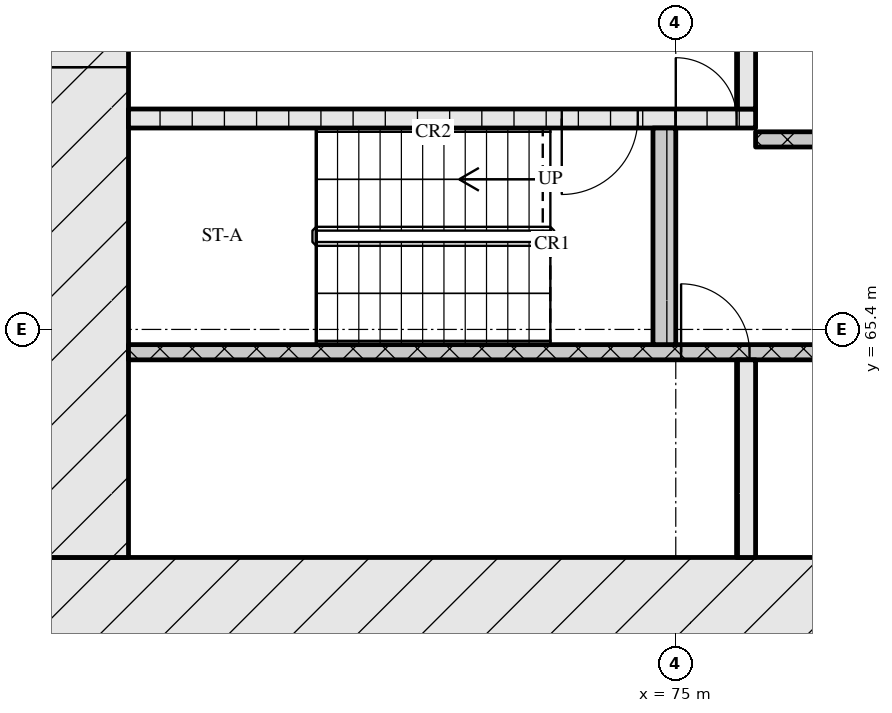
"""IFC4 building model, lengths in metres.
Left out: names, types, materials, properties, quantities, classifications, styles, units other than length and angle.
Written with IfcOpenShell. Run it as: python <this file> out.ifc"""

import sys

from ifc_helpers import new_model, si_unit, direction, frame, frame_2d, origin, place, context, subcontext, project, spatial, rectangle, extrude, element, fill, save


model = new_model("IFC4")
c1 = context("Model", 3, precision=1e-05, world=origin(), true_north=direction((0.0, 1.0)))
c2 = subcontext(c1, "Body", "Model", "MODEL_VIEW")
j1 = project(units=[si_unit("LENGTHUNIT", "METRE"), si_unit("PLANEANGLEUNIT", "RADIAN")], contexts=[c1])
p1 = place(None, origin())
s1 = spatial("IfcSite", under=j1, at=p1, CompositionType="ELEMENT")
p2 = place(p1, origin())
s2 = spatial("IfcBuilding", under=s1, at=p2, CompositionType="ELEMENT")
p3 = place(p2, frame((0.0, 0.0, 28.2)))
s3 = spatial("IfcBuildingStorey", under=s2, at=p3, CompositionType="ELEMENT", Elevation=28.2)
p4 = place(p3, frame((66.6, 61.8, 0.0), z_axis=(0.0, 0.0, 1.0), x_axis=(1.0, 0.0, 0.0)))
e1 = element("IfcWall", 1, at=p4, inside=s3, PredefinedType="SOLIDWALL", context=c2, shape_type="SweptSolid", body=[
    extrude(rectangle(XDim=42.0, YDim=1.2, at=frame_2d((21.0, 0.0))), origin(), (0.0, 0.0, 1.0), 4.2),
])
p5 = place(p4, frame((21.35, 0.0, 0.0)))
e2 = element("IfcOpeningElement", 2, at=p5, cuts=e1, PredefinedType="OPENING", context=c2, shape_type="SweptSolid", body=[
    extrude(rectangle(XDim=1.8, YDim=2.1, at=frame_2d((0.9, 1.05))), frame((0.0, 0.61, 0.0), z_axis=(0.0, -1.0, 0.0), x_axis=(1.0, 0.0, 0.0)), (0.0, 0.0, 1.0), 1.22),
])
p6 = place(p3, frame((67.2, 62.4, 0.0), z_axis=(0.0, 0.0, 1.0), x_axis=(0.0, 1.0, 0.0)))
e3 = element("IfcWall", 3, at=p6, inside=s3, PredefinedType="SOLIDWALL", context=c2, shape_type="SweptSolid", body=[
    extrude(rectangle(XDim=12.0, YDim=1.2, at=frame_2d((6.0, 0.0))), origin(), (0.0, 0.0, 1.0), 4.2),
])
p7 = place(p6, frame((6.45, 0.0, 0.0)))
e4 = element("IfcOpeningElement", 4, at=p7, cuts=e3, PredefinedType="OPENING", context=c2, shape_type="SweptSolid", body=[
    extrude(rectangle(XDim=1.2, YDim=2.1, at=frame_2d((0.6, 1.05))), frame((0.0, 0.61, 0.0), z_axis=(0.0, -1.0, 0.0), x_axis=(1.0, 0.0, 0.0)), (0.0, 0.0, 1.0), 1.22),
])
p8 = place(p3, frame((75.925, 62.4, 0.0), z_axis=(0.0, 0.0, 1.0), x_axis=(0.0, 1.0, 0.0)))
e5 = element("IfcWall", 5, at=p8, inside=s3, PredefinedType="SOLIDWALL", context=c2, shape_type="SweptSolid", body=[
    extrude(rectangle(XDim=2.6, YDim=0.25, at=frame_2d((1.3, 0.0))), origin(), (0.0, 0.0, 1.0), 4.2),
])
p9 = place(p3, frame((67.8, 65.1, 0.0), z_axis=(0.0, 0.0, 1.0), x_axis=(1.0, 0.0, 0.0)))
e6 = element("IfcWall", 6, at=p9, inside=s3, PredefinedType="SOLIDWALL", context=c2, shape_type="SweptSolid", body=[
    extrude(rectangle(XDim=18.5, YDim=0.2, at=frame_2d((9.25, 0.0))), origin(), (0.0, 0.0, 1.0), 4.2),
])
p10 = place(p9, frame((7.27, 0.0, 0.0)))
e7 = element("IfcOpeningElement", 7, at=p10, cuts=e6, PredefinedType="OPENING", context=c2, shape_type="SweptSolid", body=[
    extrude(rectangle(XDim=0.9, YDim=2.1, at=frame_2d((0.45, 1.05))), frame((0.0, 0.11, 0.0), z_axis=(0.0, -1.0, 0.0), x_axis=(1.0, 0.0, 0.0)), (0.0, 0.0, 1.0), 0.22),
])
p11 = place(p9, frame((16.6, 0.0, 0.0)))
e8 = element("IfcOpeningElement", 8, at=p11, cuts=e6, PredefinedType="OPENING", context=c2, shape_type="SweptSolid", body=[
    extrude(rectangle(XDim=1.1, YDim=2.1, at=frame_2d((0.55, 1.05))), frame((0.0, 0.11, 0.0), z_axis=(0.0, -1.0, 0.0), x_axis=(1.0, 0.0, 0.0)), (0.0, 0.0, 1.0), 0.22),
])
p12 = place(p3, frame((74.85, 65.2, 0.0), z_axis=(0.0, 0.0, 1.0), x_axis=(0.0, 1.0, 0.0)))
e9 = element("IfcWall", 9, at=p12, inside=s3, PredefinedType="SOLIDWALL", context=c2, shape_type="SweptSolid", body=[
    extrude(rectangle(XDim=2.85, YDim=0.3, at=frame_2d((1.425, 0.0))), origin(), (0.0, 0.0, 1.0), 4.2),
])
p13 = place(p3, frame((76.05, 67.9, 0.0), z_axis=(0.0, 0.0, 1.0), x_axis=(1.0, 0.0, 0.0)))
e10 = element("IfcWall", 10, at=p13, inside=s3, PredefinedType="SOLIDWALL", context=c2, shape_type="SweptSolid", body=[
    extrude(rectangle(XDim=23.1, YDim=0.2, at=frame_2d((11.55, 0.0))), origin(), (0.0, 0.0, 1.0), 4.2),
])
p14 = place(p13, frame((8.35, 0.0, 0.0)))
e11 = element("IfcOpeningElement", 11, at=p14, cuts=e10, PredefinedType="OPENING", context=c2, shape_type="SweptSolid", body=[
    extrude(rectangle(XDim=1.1, YDim=2.1, at=frame_2d((0.55, 1.05))), frame((0.0, 0.11, 0.0), z_axis=(0.0, -1.0, 0.0), x_axis=(1.0, 0.0, 0.0)), (0.0, 0.0, 1.0), 0.22),
])
p15 = place(p13, frame((10.85, 0.0, 0.0)))
e12 = element("IfcOpeningElement", 12, at=p15, cuts=e10, PredefinedType="OPENING", context=c2, shape_type="SweptSolid", body=[
    extrude(rectangle(XDim=1.1, YDim=2.1, at=frame_2d((0.55, 1.05))), frame((0.0, 0.11, 0.0), z_axis=(0.0, -1.0, 0.0), x_axis=(1.0, 0.0, 0.0)), (0.0, 0.0, 1.0), 0.22),
])
p16 = place(p13, frame((13.55, 0.0, 0.0)))
e13 = element("IfcOpeningElement", 13, at=p16, cuts=e10, PredefinedType="OPENING", context=c2, shape_type="SweptSolid", body=[
    extrude(rectangle(XDim=1.0, YDim=2.1, at=frame_2d((0.5, 1.05))), frame((0.0, 0.11, 0.0), z_axis=(0.0, -1.0, 0.0), x_axis=(1.0, 0.0, 0.0)), (0.0, 0.0, 1.0), 0.22),
])
p17 = place(p3, frame((67.8, 68.175, 0.0), z_axis=(0.0, 0.0, 1.0), x_axis=(1.0, 0.0, 0.0)))
e14 = element("IfcWall", 14, at=p17, inside=s3, PredefinedType="SOLIDWALL", context=c2, shape_type="SweptSolid", body=[
    extrude(rectangle(XDim=8.25, YDim=0.25, at=frame_2d((4.125, 0.0))), origin(), (0.0, 0.0, 1.0), 4.2),
])
p18 = place(p17, frame((5.7, 0.0, 0.0)))
e15 = element("IfcOpeningElement", 15, at=p18, cuts=e14, PredefinedType="OPENING", context=c2, shape_type="SweptSolid", body=[
    extrude(rectangle(XDim=1.0, YDim=2.1, at=frame_2d((0.5, 1.05))), frame((0.0, 0.135, 0.0), z_axis=(0.0, -1.0, 0.0), x_axis=(1.0, 0.0, 0.0)), (0.0, 0.0, 1.0), 0.27),
])
p19 = place(p17, frame((7.2, 0.0, 0.0)))
e16 = element("IfcOpeningElement", 16, at=p19, cuts=e14, PredefinedType="OPENING", context=c2, shape_type="SweptSolid", body=[
    extrude(rectangle(XDim=0.8, YDim=2.1, at=frame_2d((0.4, 1.05))), frame((0.0, 0.135, 0.0), z_axis=(0.0, -1.0, 0.0), x_axis=(1.0, 0.0, 0.0)), (0.0, 0.0, 1.0), 0.27),
])
p20 = place(p3, frame((75.925, 68.3, 0.0), z_axis=(0.0, 0.0, 1.0), x_axis=(0.0, 1.0, 0.0)))
e17 = element("IfcWall", 17, at=p20, inside=s3, PredefinedType="SOLIDWALL", context=c2, shape_type="SweptSolid", body=[
    extrude(rectangle(XDim=2.3, YDim=0.25, at=frame_2d((1.15, 0.0))), origin(), (0.0, 0.0, 1.0), 4.2),
])
p21 = place(p10, origin())
e18 = element("IfcDoor", 18, at=p21, inside=s3, OperationType="SINGLE_SWING_LEFT", PredefinedType="DOOR", context=c2, shape_type="SweptSolid", body=[
    extrude(rectangle(XDim=0.9, YDim=2.1, at=frame_2d((0.45, 1.05))), frame((0.0, 0.025, 0.0), z_axis=(0.0, -1.0, 0.0), x_axis=(1.0, 0.0, 0.0)), (0.0, 0.0, 1.0), 0.05),
])
fill(e7, e18)
p22 = place(p18, origin())
e19 = element("IfcDoor", 19, at=p22, inside=s3, OperationType="SINGLE_SWING_RIGHT", PredefinedType="DOOR", context=c2, shape_type="SweptSolid", body=[
    extrude(rectangle(XDim=1.0, YDim=2.1, at=frame_2d((0.5, 1.05))), frame((0.0, 0.025, 0.0), z_axis=(0.0, -1.0, 0.0), x_axis=(1.0, 0.0, 0.0)), (0.0, 0.0, 1.0), 0.05),
])
fill(e15, e19)
p23 = place(p19, origin())
e20 = element("IfcDoor", 20, at=p23, inside=s3, OperationType="SINGLE_SWING_LEFT", PredefinedType="DOOR", context=c2, shape_type="SweptSolid", body=[
    extrude(rectangle(XDim=0.8, YDim=2.1, at=frame_2d((0.4, 1.05))), frame((0.0, 0.025, 0.0), z_axis=(0.0, -1.0, 0.0), x_axis=(1.0, 0.0, 0.0)), (0.0, 0.0, 1.0), 0.05),
])
fill(e16, e20)
p24 = place(p7, origin())
e21 = element("IfcDoor", 21, at=p24, inside=s3, OperationType="SINGLE_SWING_LEFT", PredefinedType="DOOR", context=c2, shape_type="SweptSolid", body=[
    extrude(rectangle(XDim=1.2, YDim=2.1, at=frame_2d((0.6, 1.05))), frame((0.0, 0.025, 0.0), z_axis=(0.0, -1.0, 0.0), x_axis=(1.0, 0.0, 0.0)), (0.0, 0.0, 1.0), 0.05),
])
fill(e4, e21)
save(model, sys.argv[1])
